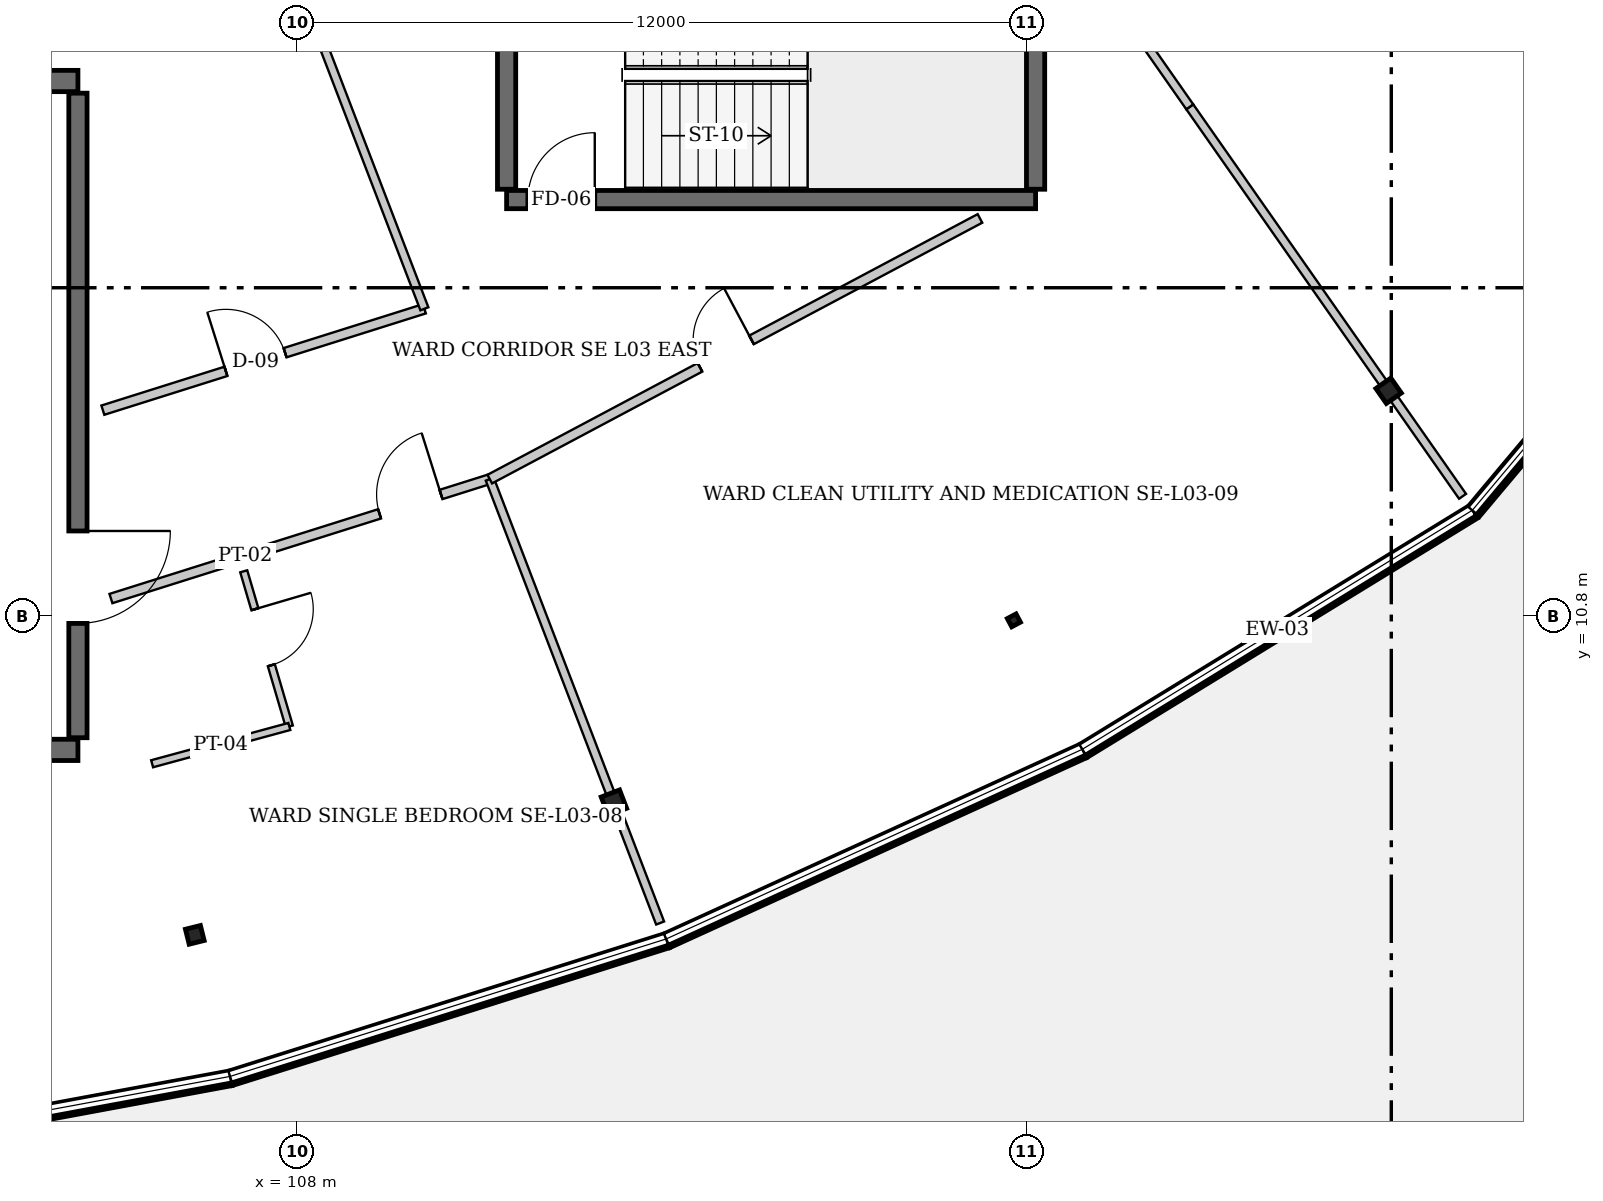
"""IFC4 building model, lengths in metres.
Left out: names, types, materials, properties, quantities, classifications, styles, units other than length and angle.
Written with IfcOpenShell. Run it as: python <this file> out.ifc"""

import sys

from ifc_helpers import new_model, si_unit, direction, frame, frame_2d, origin, origin_2d, place, context, subcontext, project, spatial, rectangle, hollow_rectangle, hollow_circle, i_section, extrude, element, fill, save


model = new_model("IFC4")
c1 = context("Model", 3, precision=1e-05, world=origin(), true_north=direction((0.0, 1.0)))
c2 = subcontext(c1, "Body", "Model", "MODEL_VIEW")
j1 = project(units=[si_unit("LENGTHUNIT", "METRE"), si_unit("PLANEANGLEUNIT", "RADIAN")], contexts=[c1])
p1 = place(None, origin())
s1 = spatial("IfcSite", under=j1, at=p1, CompositionType="ELEMENT")
p2 = place(p1, origin())
s2 = spatial("IfcBuilding", under=s1, at=p2, CompositionType="ELEMENT")
p3 = place(p2, frame((0.0, 0.0, 14.4)))
s3 = spatial("IfcBuildingStorey", under=s2, at=p3, CompositionType="ELEMENT", Elevation=14.4)
p4 = place(p3, frame((106.322, 5.558, 0.0), z_axis=(0.0, 0.0, 1.0), x_axis=(-0.2419218956, 0.970295726276, 0.0)))
e1 = element("IfcColumn", 1, at=p4, inside=s3, PredefinedType="COLUMN", context=c2, shape_type="SweptSolid", body=[
    extrude(i_section(OverallWidth=0.254, OverallDepth=0.254, WebThickness=0.009, FlangeThickness=0.014, at=origin_2d()), origin(), (0.0, 0.0, 1.0), 3.9),
])
p5 = place(p3, frame((113.215, 7.732, 0.0), z_axis=(0.0, 0.0, 1.0), x_axis=(-0.358367949545, 0.933580426497, 0.0)))
e2 = element("IfcColumn", 2, at=p5, inside=s3, PredefinedType="COLUMN", context=c2, shape_type="SweptSolid", body=[
    extrude(hollow_circle(Radius=0.162, WallThickness=0.013, at=origin_2d()), origin(), (0.0, 0.0, 1.0), 3.9),
])
p6 = place(p3, frame((119.793, 10.73, 0.0), z_axis=(0.0, 0.0, 1.0), x_axis=(-0.469471562786, 0.882947592859, 0.0)))
e3 = element("IfcColumn", 3, at=p6, inside=s3, PredefinedType="COLUMN", context=c2, shape_type="SweptSolid", body=[
    extrude(i_section(OverallWidth=0.154, OverallDepth=0.162, WebThickness=0.008, FlangeThickness=0.011, at=origin_2d()), origin(), (0.0, 0.0, 1.0), 3.9),
])
p7 = place(p3, frame((125.956, 14.506, 0.0), z_axis=(0.0, 0.0, 1.0), x_axis=(-0.573576436351, 0.819152044289, 0.0)))
e4 = element("IfcColumn", 4, at=p7, inside=s3, PredefinedType="COLUMN", context=c2, shape_type="SweptSolid", body=[
    extrude(hollow_rectangle(XDim=0.3, YDim=0.3, WallThickness=0.012, at=origin_2d()), origin(), (0.0, 0.0, 1.0), 3.9),
])
p8 = place(p3, frame((84.0, 19.6, 0.0), z_axis=(0.0, 0.0, 1.0), x_axis=(1.0, 0.0, 0.0)))
e5 = element("IfcWall", 5, at=p8, inside=s3, PredefinedType="SHEAR", context=c2, shape_type="SweptSolid", body=[
    extrude(rectangle(XDim=20.4, YDim=0.35, at=frame_2d((10.2, 0.0))), origin(), (0.0, 0.0, 1.0), 3.9),
])
p9 = place(p3, frame((104.4, 8.6, 0.0), z_axis=(0.0, 0.0, 1.0), x_axis=(-1.0, 0.0, 0.0)))
e6 = element("IfcWall", 6, at=p9, inside=s3, PredefinedType="SHEAR", context=c2, shape_type="SweptSolid", body=[
    extrude(rectangle(XDim=20.4, YDim=0.35, at=frame_2d((10.2, 0.0))), origin(), (0.0, 0.0, 1.0), 3.9),
])
p10 = place(p9, frame((2.2, 0.0, 0.0)))
e7 = element("IfcOpeningElement", 7, at=p10, cuts=e6, PredefinedType="OPENING", context=c2, shape_type="SweptSolid", body=[
    extrude(rectangle(XDim=1.64, YDim=2.2, at=frame_2d((0.82, 1.1))), frame((0.0, 0.185, 0.0), z_axis=(0.0, -1.0, 0.0), x_axis=(1.0, 0.0, 0.0)), (0.0, 0.0, 1.0), 0.37),
])
p11 = place(p9, frame((13.0, 0.0, 0.0)))
e8 = element("IfcOpeningElement", 8, at=p11, cuts=e6, PredefinedType="OPENING", context=c2, shape_type="SweptSolid", body=[
    extrude(rectangle(XDim=1.52, YDim=2.16, at=frame_2d((0.76, 1.08))), frame((0.0, 0.185, 0.0), z_axis=(0.0, -1.0, 0.0), x_axis=(1.0, 0.0, 0.0)), (0.0, 0.0, 1.0), 0.37),
])
p12 = place(p3, frame((104.4, 19.4, 0.0), z_axis=(0.0, 0.0, 1.0), x_axis=(0.0, -1.0, 0.0)))
e9 = element("IfcWall", 9, at=p12, inside=s3, PredefinedType="SHEAR", context=c2, shape_type="SweptSolid", body=[
    extrude(rectangle(XDim=10.6, YDim=0.3, at=frame_2d((5.3, 0.0))), origin(), (0.0, 0.0, 1.0), 3.9),
])
p13 = place(p12, frame((7.2, 0.0, 0.0)))
e10 = element("IfcOpeningElement", 10, at=p13, cuts=e9, PredefinedType="OPENING", context=c2, shape_type="SweptSolid", body=[
    extrude(rectangle(XDim=1.52, YDim=2.16, at=frame_2d((0.76, 1.08))), frame((0.0, 0.16, 0.0), z_axis=(0.0, -1.0, 0.0), x_axis=(1.0, 0.0, 0.0)), (0.0, 0.0, 1.0), 0.32),
])
p14 = place(p3, frame((111.45, 17.65, 0.0), z_axis=(0.0, 0.0, 1.0), x_axis=(1.0, 0.0, 0.0)))
e11 = element("IfcWall", 11, at=p14, inside=s3, PredefinedType="SHEAR", context=c2, shape_type="SweptSolid", body=[
    extrude(rectangle(XDim=8.7, YDim=0.3, at=frame_2d((4.35, 0.0))), origin(), (0.0, 0.0, 1.0), 3.9),
])
p15 = place(p14, frame((0.35, 0.0, 0.0)))
e12 = element("IfcOpeningElement", 12, at=p15, cuts=e11, PredefinedType="OPENING", context=c2, shape_type="SweptSolid", body=[
    extrude(rectangle(XDim=1.1, YDim=2.15, at=frame_2d((0.55, 1.075))), frame((0.0, 0.16, 0.0), z_axis=(0.0, -1.0, 0.0), x_axis=(1.0, 0.0, 0.0)), (0.0, 0.0, 1.0), 0.32),
])
for number, where, z_axis, x_axis in (
    (13, (111.45, 17.82, 0.0), (0.0, 0.0, 1.0), (0.0, 1.0, 0.0)),
    (14, (120.15, 17.82, 0.0), (0.0, 0.0, 1.0), (0.0, 1.0, 0.0)),
):
    element("IfcWall", number, at=place(p3, frame(where, z_axis=z_axis, x_axis=x_axis)), inside=s3, PredefinedType="SHEAR", context=c2, shape_type="SweptSolid", body=[
        extrude(rectangle(XDim=3.76, YDim=0.3, at=frame_2d((1.88, 0.0))), origin(), (0.0, 0.0, 1.0), 3.9),
    ])
p16 = place(p3, frame((106.902, 3.23, 0.0), z_axis=(0.0, 0.0, 1.0), x_axis=(-0.983242805192, -0.18230081195, 0.0)))
e15 = element("IfcWall", 15, at=p16, inside=s3, PredefinedType="STANDARD", context=c2, shape_type="SweptSolid", body=[
    extrude(rectangle(XDim=7.521, YDim=0.22, at=frame_2d((3.76, 0.0))), origin(), (0.0, 0.0, 1.0), 1.05),
])
p17 = place(p3, frame((114.075, 5.491, 0.0), z_axis=(0.0, 0.0, 1.0), x_axis=(-0.953740021466, -0.300632618747, 0.0)))
e16 = element("IfcWall", 16, at=p17, inside=s3, PredefinedType="STANDARD", context=c2, shape_type="SweptSolid", body=[
    extrude(rectangle(XDim=7.521, YDim=0.22, at=frame_2d((3.76, 0.0))), origin(), (0.0, 0.0, 1.0), 1.05),
])
p18 = place(p3, frame((120.919, 8.61, 0.0), z_axis=(0.0, 0.0, 1.0), x_axis=(-0.909953604353, -0.414710064895, 0.0)))
e17 = element("IfcWall", 17, at=p18, inside=s3, PredefinedType="STANDARD", context=c2, shape_type="SweptSolid", body=[
    extrude(rectangle(XDim=7.521, YDim=0.22, at=frame_2d((3.761, 0.0))), origin(), (0.0, 0.0, 1.0), 1.05),
])
p19 = place(p3, frame((127.332, 12.54, 0.0), z_axis=(0.0, 0.0, 1.0), x_axis=(-0.852640903338, -0.522497358803, 0.0)))
e18 = element("IfcWall", 18, at=p19, inside=s3, PredefinedType="STANDARD", context=c2, shape_type="SweptSolid", body=[
    extrude(rectangle(XDim=7.521, YDim=0.22, at=frame_2d((3.761, 0.0))), origin(), (0.0, 0.0, 1.0), 1.05),
])
p20 = place(p3, frame((130.527, 16.347, 0.0), z_axis=(0.0, 0.0, 1.0), x_axis=(-0.642871763415, -0.765973821879, 0.0)))
e19 = element("IfcWall", 19, at=p20, inside=s3, PredefinedType="STANDARD", context=c2, shape_type="SweptSolid", body=[
    extrude(rectangle(XDim=4.97, YDim=0.22, at=frame_2d((2.485, 0.0))), origin(), (0.0, 0.0, 1.0), 1.05),
])
p21 = place(p3, frame((107.127, 11.537, 0.0), z_axis=(0.0, 0.0, 1.0), x_axis=(0.281962578993, -0.959425403066, 0.0)))
e20 = element("IfcWall", 20, at=p21, inside=s3, PredefinedType="PARTITIONING", context=c2, shape_type="SweptSolid", body=[
    extrude(rectangle(XDim=2.66, YDim=0.12, at=frame_2d((1.33, 0.0))), origin(), (0.0, 0.0, 1.0), 3.289),
])
p22 = place(p21, frame((0.65, 0.0, 0.0)))
e21 = element("IfcOpeningElement", 21, at=p22, cuts=e20, PredefinedType="OPENING", context=c2, shape_type="SweptSolid", body=[
    extrude(rectangle(XDim=0.96, YDim=2.06, at=frame_2d((0.48, 1.03))), frame((0.0, 0.07, 0.0), z_axis=(0.0, -1.0, 0.0), x_axis=(1.0, 0.0, 0.0)), (0.0, 0.0, 1.0), 0.14),
])
p23 = place(p3, frame((105.62, 8.372, 0.0), z_axis=(0.0, 0.0, 1.0), x_axis=(0.965030735715, 0.262136756532, 0.0)))
e22 = element("IfcWall", 22, at=p23, inside=s3, PredefinedType="PARTITIONING", context=c2, shape_type="SweptSolid", body=[
    extrude(rectangle(XDim=2.339, YDim=0.12, at=frame_2d((1.169, 0.0))), origin(), (0.0, 0.0, 1.0), 3.085),
])
p24 = place(p3, frame((104.943, 11.089, 0.0), z_axis=(0.0, 0.0, 1.0), x_axis=(0.953736183483, 0.30064479426, 0.0)))
e23 = element("IfcWall", 23, at=p24, inside=s3, PredefinedType="PARTITIONING", context=c2, shape_type="SweptSolid", body=[
    extrude(rectangle(XDim=6.532, YDim=0.16, at=frame_2d((3.266, 0.0))), origin(), (0.0, 0.0, 1.0), 3.085),
])
p25 = place(p24, frame((4.632, 0.0, 0.0)))
e24 = element("IfcOpeningElement", 24, at=p25, cuts=e23, PredefinedType="OPENING", context=c2, shape_type="SweptSolid", body=[
    extrude(rectangle(XDim=1.06, YDim=2.1, at=frame_2d((0.53, 1.05))), frame((0.0, 0.09, 0.0), z_axis=(0.0, -1.0, 0.0), x_axis=(1.0, 0.0, 0.0)), (0.0, 0.0, 1.0), 0.18),
])
p26 = place(p3, frame((111.173, 13.053, 0.0), z_axis=(0.0, 0.0, 1.0), x_axis=(0.358342954102, -0.933590020965, 0.0)))
e25 = element("IfcWall", 25, at=p26, inside=s3, PredefinedType="PARTITIONING", context=c2, shape_type="SweptSolid", body=[
    extrude(rectangle(XDim=7.819, YDim=0.14, at=frame_2d((3.91, 0.0))), origin(), (0.0, 0.0, 1.0), 3.088),
])
p27 = place(p3, frame((104.81, 14.187, 0.0), z_axis=(0.0, 0.0, 1.0), x_axis=(0.953730291319, 0.300663485347, 0.0)))
e26 = element("IfcWall", 26, at=p27, inside=s3, PredefinedType="PARTITIONING", context=c2, shape_type="SweptSolid", body=[
    extrude(rectangle(XDim=5.544, YDim=0.16, at=frame_2d((2.772, 0.0))), origin(), (0.0, 0.0, 1.0), 3.088),
])
p28 = place(p27, frame((2.122, 0.0, 0.0)))
e27 = element("IfcOpeningElement", 27, at=p28, cuts=e26, PredefinedType="OPENING", context=c2, shape_type="SweptSolid", body=[
    extrude(rectangle(XDim=1.02, YDim=2.08, at=frame_2d((0.51, 1.04))), frame((0.0, 0.09, 0.0), z_axis=(0.0, -1.0, 0.0), x_axis=(1.0, 0.0, 0.0)), (0.0, 0.0, 1.0), 0.18),
])
p29 = place(p3, frame((110.098, 15.854, 0.0), z_axis=(0.0, 0.0, 1.0), x_axis=(-0.358410014332, 0.933564278251, 0.0)))
e28 = element("IfcWall", 28, at=p29, inside=s3, PredefinedType="PARTITIONING", context=c2, shape_type="SweptSolid", body=[
    extrude(rectangle(XDim=7.821, YDim=0.14, at=frame_2d((3.91, 0.0))), origin(), (0.0, 0.0, 1.0), 3.088),
])
p30 = place(p3, frame((111.173, 13.053, 0.0), z_axis=(0.0, 0.0, 1.0), x_axis=(0.882926631997, 0.469510982311, 0.0)))
e29 = element("IfcWall", 29, at=p30, inside=s3, PredefinedType="PARTITIONING", context=c2, shape_type="SweptSolid", body=[
    extrude(rectangle(XDim=9.131, YDim=0.16, at=frame_2d((4.565, 0.0))), origin(), (0.0, 0.0, 1.0), 3.088),
])
p31 = place(p30, frame((3.916, 0.0, 0.0)))
e30 = element("IfcOpeningElement", 30, at=p31, cuts=e29, PredefinedType="OPENING", context=c2, shape_type="SweptSolid", body=[
    extrude(rectangle(XDim=0.96, YDim=2.06, at=frame_2d((0.48, 1.03))), frame((0.0, 0.09, 0.0), z_axis=(0.0, -1.0, 0.0), x_axis=(1.0, 0.0, 0.0)), (0.0, 0.0, 1.0), 0.18),
])
p32 = place(p3, frame((122.686, 19.175, 0.0), z_axis=(0.0, 0.0, 1.0), x_axis=(0.573682336084, -0.819077882295, 0.0)))
e31 = element("IfcWall", 31, at=p32, inside=s3, PredefinedType="PARTITIONING", context=c2, shape_type="SweptSolid", body=[
    extrude(rectangle(XDim=7.82, YDim=0.14, at=frame_2d((3.91, 0.0))), origin(), (0.0, 0.0, 1.0), 2.595),
])
p33 = place(p3, frame((120.966, 21.633, 0.0), z_axis=(0.0, 0.0, 1.0), x_axis=(0.573320330817, -0.819331311663, 0.0)))
e32 = element("IfcWall", 32, at=p33, inside=s3, PredefinedType="PARTITIONING", context=c2, shape_type="SweptSolid", body=[
    extrude(rectangle(XDim=3.0, YDim=0.14, at=frame_2d((1.5, 0.0))), origin(), (0.0, 0.0, 1.0), 2.595),
])
p34 = place(p33, frame((0.8, 0.0, 0.0)))
e33 = element("IfcOpeningElement", 33, at=p34, cuts=e32, PredefinedType="OPENING", context=c2, shape_type="SweptSolid", body=[
    extrude(rectangle(XDim=0.9, YDim=2.1, at=frame_2d((0.45, 1.05))), frame((0.0, 0.08, 0.0), z_axis=(0.0, -1.0, 0.0), x_axis=(1.0, 0.0, 0.0)), (0.0, 0.0, 1.0), 0.16),
])
p35 = place(p15, origin())
e34 = element("IfcDoor", 34, at=p35, inside=s3, OperationType="SINGLE_SWING_RIGHT", PredefinedType="DOOR", context=c2, shape_type="SweptSolid", body=[
    extrude(rectangle(XDim=1.1, YDim=2.15, at=frame_2d((0.55, 1.075))), frame((0.0, 0.025, 0.0), z_axis=(0.0, -1.0, 0.0), x_axis=(1.0, 0.0, 0.0)), (0.0, 0.0, 1.0), 0.05),
])
fill(e12, e34)
p36 = place(p13, origin())
e35 = element("IfcDoor", 35, at=p36, inside=s3, OperationType="SINGLE_SWING_LEFT", PredefinedType="DOOR", context=c2, shape_type="SweptSolid", body=[
    extrude(rectangle(XDim=1.52, YDim=2.16, at=frame_2d((0.76, 1.08))), frame((0.0, 0.025, 0.0), z_axis=(0.0, -1.0, 0.0), x_axis=(1.0, 0.0, 0.0)), (0.0, 0.0, 1.0), 0.05),
])
fill(e10, e35)
p37 = place(p22, origin())
e36 = element("IfcDoor", 36, at=p37, inside=s3, OperationType="SINGLE_SWING_LEFT", PredefinedType="DOOR", context=c2, shape_type="SweptSolid", body=[
    extrude(rectangle(XDim=0.96, YDim=2.06, at=frame_2d((0.48, 1.03))), frame((0.0, 0.025, 0.0), z_axis=(0.0, -1.0, 0.0), x_axis=(1.0, 0.0, 0.0)), (0.0, 0.0, 1.0), 0.05),
])
fill(e21, e36)
p38 = place(p25, origin())
e37 = element("IfcDoor", 37, at=p38, inside=s3, OperationType="SINGLE_SWING_RIGHT", PredefinedType="DOOR", context=c2, shape_type="SweptSolid", body=[
    extrude(rectangle(XDim=1.06, YDim=2.1, at=frame_2d((0.53, 1.05))), frame((0.0, 0.025, 0.0), z_axis=(0.0, -1.0, 0.0), x_axis=(1.0, 0.0, 0.0)), (0.0, 0.0, 1.0), 0.05),
])
fill(e24, e37)
p39 = place(p28, origin())
e38 = element("IfcDoor", 38, at=p39, inside=s3, OperationType="SINGLE_SWING_LEFT", PredefinedType="DOOR", context=c2, shape_type="SweptSolid", body=[
    extrude(rectangle(XDim=1.02, YDim=2.08, at=frame_2d((0.51, 1.04))), frame((0.0, 0.025, 0.0), z_axis=(0.0, -1.0, 0.0), x_axis=(1.0, 0.0, 0.0)), (0.0, 0.0, 1.0), 0.05),
])
fill(e27, e38)
p40 = place(p31, origin())
e39 = element("IfcDoor", 39, at=p40, inside=s3, OperationType="SINGLE_SWING_RIGHT", PredefinedType="DOOR", context=c2, shape_type="SweptSolid", body=[
    extrude(rectangle(XDim=0.96, YDim=2.06, at=frame_2d((0.48, 1.03))), frame((0.0, 0.025, 0.0), z_axis=(0.0, -1.0, 0.0), x_axis=(1.0, 0.0, 0.0)), (0.0, 0.0, 1.0), 0.05),
])
fill(e30, e39)
save(model, sys.argv[1])
